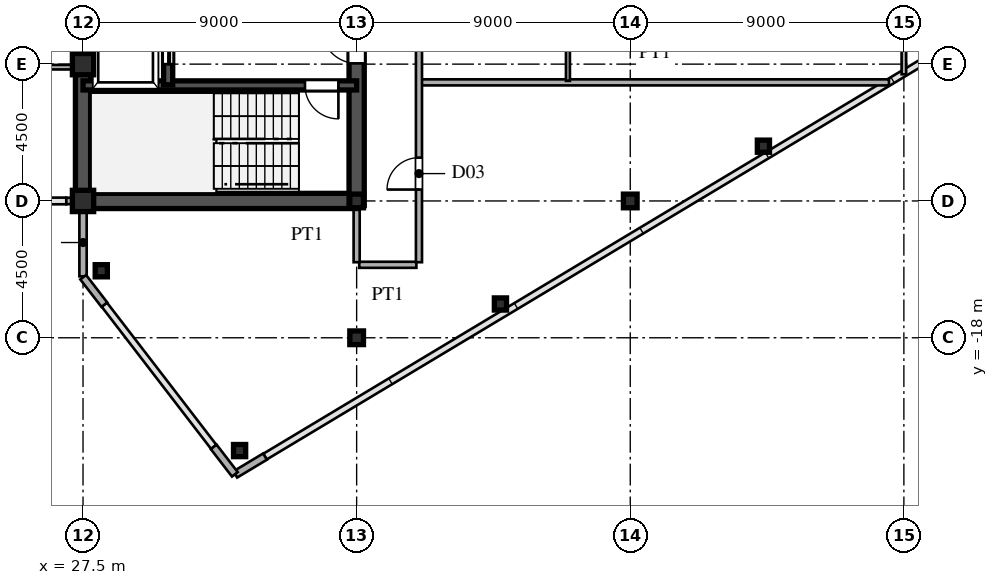
"""IFC4 building model, lengths in metres.
Left out: names, types, materials, properties, quantities, classifications, styles, units other than length and angle.
Written with IfcOpenShell. Run it as: python <this file> out.ifc"""

import sys

from ifc_helpers import new_model, si_unit, direction, frame, frame_2d, origin, origin_2d, place, context, subcontext, project, spatial, rectangle, hollow_rectangle, i_section, extrude, source, transform, mapped, element, fill, save


model = new_model("IFC4")
c1 = context("Model", 3, precision=1e-05, world=origin(), true_north=direction((0.0, 1.0)))
c2 = subcontext(c1, "Body", "Model", "MODEL_VIEW")
j1 = project(units=[si_unit("LENGTHUNIT", "METRE"), si_unit("PLANEANGLEUNIT", "RADIAN")], contexts=[c1])
p1 = place(None, origin())
s1 = spatial("IfcSite", under=j1, at=p1, CompositionType="ELEMENT")
p2 = place(p1, origin())
s2 = spatial("IfcBuilding", under=s1, at=p2, CompositionType="ELEMENT")
p3 = place(p2, frame((0.0, 0.0, 265.65)))
s3 = spatial("IfcBuildingStorey", under=s2, at=p3, CompositionType="ELEMENT", Elevation=265.65)
m1 = source(origin(), c2, "Body", "SweptSolid", [
    extrude(hollow_rectangle(XDim=0.7, YDim=0.7, WallThickness=0.03, at=origin_2d()), origin(), (0.0, 0.0, 1.0), 3.75),
])
for number, where, z_axis, x_axis in (
    (1, (27.5, -13.5, 0.0), (0.0, 0.0, 1.0), (1.0, 0.0, 0.0)),
    (2, (27.5, -9.0, 0.0), (0.0, 0.0, 1.0), (1.0, 0.0, 0.0)),
):
    element("IfcColumn", number, at=place(p3, frame(where, z_axis=z_axis, x_axis=x_axis)), inside=s3, PredefinedType="COLUMN", context=c2, shape_type="MappedRepresentation", body=[
        mapped(m1, transform((0.0, 0.0, 0.0), scale=1.0)),
    ])
m2 = source(origin(), c2, "Body", "SweptSolid", [
    extrude(i_section(OverallWidth=0.45, OverallDepth=0.45, WebThickness=0.016, FlangeThickness=0.025, at=origin_2d()), origin(), (0.0, 0.0, 1.0), 3.75),
])
for number, where, z_axis, x_axis in (
    (3, (36.5, -18.0, 0.0), (0.0, 0.0, 1.0), (1.0, 0.0, 0.0)),
    (4, (36.5, -13.5, 0.0), (0.0, 0.0, 1.0), (1.0, 0.0, 0.0)),
    (5, (45.5, -13.5, 0.0), (0.0, 0.0, 1.0), (1.0, 0.0, 0.0)),
):
    element("IfcColumn", number, at=place(p3, frame(where, z_axis=z_axis, x_axis=x_axis)), inside=s3, PredefinedType="COLUMN", context=c2, shape_type="MappedRepresentation", body=[
        mapped(m2, transform((0.0, 0.0, 0.0), scale=1.0)),
    ])
m3 = source(origin(), c2, "Body", "SweptSolid", [
    extrude(hollow_rectangle(XDim=0.4, YDim=0.4, WallThickness=0.016, at=origin_2d()), origin(), (0.0, 0.0, 1.0), 3.75),
])
for number, where, z_axis, x_axis in (
    (6, (32.65, -21.71, 0.0), (0.0, 0.0, 1.0), (1.0, 0.0, 0.0)),
    (7, (28.1, -15.796, 0.0), (0.0, 0.0, 1.0), (1.0, 0.0, 0.0)),
    (8, (41.23, -16.889, 0.0), (0.0, 0.0, 1.0), (1.0, 0.0, 0.0)),
    (9, (49.88, -11.699, 0.0), (0.0, 0.0, 1.0), (1.0, 0.0, 0.0)),
):
    element("IfcColumn", number, at=place(p3, frame(where, z_axis=z_axis, x_axis=x_axis)), inside=s3, PredefinedType="COLUMN", context=c2, shape_type="MappedRepresentation", body=[
        mapped(m3, transform((0.0, 0.0, 0.0), scale=1.0)),
    ])
p4 = place(p3, frame((32.509, -22.495, 0.0), z_axis=(0.0, 0.0, 1.0), x_axis=(0.85743623509, 0.514590228002, 0.0)))
e10 = element("IfcWall", 10, at=p4, inside=s3, PredefinedType="SOLIDWALL", context=c2, shape_type="SweptSolid", body=[
    extrude(rectangle(XDim=1.14, YDim=0.24, at=frame_2d((0.57, 0.0))), origin(), (0.0, 0.0, 1.0), 3.49),
])
p5 = place(p3, frame((27.5, -15.98, 0.0), z_axis=(0.0, 0.0, 1.0), x_axis=(0.0, 1.0, 0.0)))
e11 = element("IfcWall", 11, at=p5, inside=s3, PredefinedType="SOLIDWALL", context=c2, shape_type="SweptSolid", body=[
    extrude(rectangle(XDim=1.605, YDim=0.24, at=frame_2d((0.803, 0.0))), origin(), (0.0, 0.0, 1.0), 3.49),
])
p6 = place(p3, frame((27.5, -14.375, 0.0), z_axis=(0.0, 0.0, 1.0), x_axis=(0.0, 1.0, 0.0)))
e12 = element("IfcWall", 12, at=p6, inside=s3, PredefinedType="SOLIDWALL", context=c2, shape_type="SweptSolid", body=[
    extrude(rectangle(XDim=0.62, YDim=0.24, at=frame_2d((0.31, 0.0))), origin(), (0.0, 0.0, 1.0), 2.99),
])
for number, where, z_axis, x_axis in (
    (13, (27.506, -16.008, 0.0), (0.0, 0.0, 1.0), (0.61, -0.793, 0.0)),
    (14, (31.799, -21.588, 0.0), (0.0, 0.0, 1.0), (0.61, -0.793, 0.0)),
):
    element("IfcWall", number, at=place(p3, frame(where, z_axis=z_axis, x_axis=x_axis)), inside=s3, PredefinedType="SOLIDWALL", context=c2, shape_type="SweptSolid", body=[
        extrude(rectangle(XDim=1.14, YDim=0.24, at=frame_2d((0.57, 0.0))), origin(), (0.0, 0.0, 1.0), 3.49),
    ])
p7 = place(p3, frame((26.95, -13.5, 0.0), z_axis=(0.0, 0.0, 1.0), x_axis=(1.0, 0.0, 0.0)))
e15 = element("IfcWall", 15, at=p7, inside=s3, PredefinedType="SOLIDWALL", context=c2, shape_type="SweptSolid", body=[
    extrude(rectangle(XDim=0.54, YDim=0.21, at=frame_2d((0.27, 0.0))), origin(), (0.0, 0.0, 1.0), 2.99),
])
p8 = place(p3, frame((27.5, -13.5, 0.0), z_axis=(0.0, 0.0, 1.0), x_axis=(0.0, 1.0, 0.0)))
e16 = element("IfcWall", 16, at=p8, inside=s3, PredefinedType="SHEAR", context=c2, shape_type="SweptSolid", body=[
    extrude(rectangle(XDim=12.2, YDim=0.5, at=frame_2d((6.1, 0.0))), origin(), (0.0, 0.0, 1.0), 3.49),
])
p9 = place(p3, frame((27.5, -13.5, 0.0), z_axis=(0.0, 0.0, 1.0), x_axis=(1.0, 0.0, 0.0)))
e17 = element("IfcWall", 17, at=p9, inside=s3, PredefinedType="SHEAR", context=c2, shape_type="SweptSolid", body=[
    extrude(rectangle(XDim=9.0, YDim=0.5, at=frame_2d((4.5, 0.0))), origin(), (0.0, 0.0, 1.0), 3.49),
])
p10 = place(p3, frame((36.5, -13.65, 0.0), z_axis=(0.0, 0.0, 1.0), x_axis=(0.0, 1.0, 0.0)))
e18 = element("IfcWall", 18, at=p10, inside=s3, PredefinedType="SHEAR", context=c2, shape_type="SweptSolid", body=[
    extrude(rectangle(XDim=7.15, YDim=0.5, at=frame_2d((3.575, 0.0))), origin(), (0.0, 0.0, 1.0), 3.49),
])
p11 = place(p10, frame((4.675, 0.0, 0.0)))
e19 = element("IfcOpeningElement", 19, at=p11, cuts=e18, PredefinedType="OPENING", context=c2, shape_type="SweptSolid", body=[
    extrude(rectangle(XDim=1.15, YDim=2.2, at=frame_2d((0.575, 1.1))), frame((0.0, 0.26, 0.0), z_axis=(0.0, -1.0, 0.0), x_axis=(1.0, 0.0, 0.0)), (0.0, 0.0, 1.0), 0.52),
])
p12 = place(p3, frame((27.5, -9.7, 0.0), z_axis=(0.0, 0.0, 1.0), x_axis=(1.0, 0.0, 0.0)))
e20 = element("IfcWall", 20, at=p12, inside=s3, PredefinedType="SHEAR", context=c2, shape_type="SweptSolid", body=[
    extrude(rectangle(XDim=9.0, YDim=0.3, at=frame_2d((4.5, 0.0))), origin(), (0.0, 0.0, 1.0), 3.49),
])
p13 = place(p12, frame((7.3, 0.0, 0.0)))
e21 = element("IfcOpeningElement", 21, at=p13, cuts=e20, PredefinedType="OPENING", context=c2, shape_type="SweptSolid", body=[
    extrude(rectangle(XDim=1.1, YDim=2.2, at=frame_2d((0.55, 1.1))), frame((0.0, 0.16, 0.0), z_axis=(0.0, -1.0, 0.0), x_axis=(1.0, 0.0, 0.0)), (0.0, 0.0, 1.0), 0.32),
])
p14 = place(p3, frame((30.3, -9.68, 0.0), z_axis=(0.0, 0.0, 1.0), x_axis=(0.0, 1.0, 0.0)))
e22 = element("IfcWall", 22, at=p14, inside=s3, PredefinedType="SHEAR", context=c2, shape_type="SweptSolid", body=[
    extrude(rectangle(XDim=2.56, YDim=0.3, at=frame_2d((1.28, 0.0))), origin(), (0.0, 0.0, 1.0), 3.49),
])
p15 = place(p14, frame((0.68, 0.0, 0.0)))
e23 = element("IfcOpeningElement", 23, at=p15, cuts=e22, PredefinedType="OPENING", context=c2, shape_type="SweptSolid", body=[
    extrude(rectangle(XDim=1.2, YDim=2.25, at=frame_2d((0.6, 1.125))), frame((0.0, 0.16, 0.0), z_axis=(0.0, -1.0, 0.0), x_axis=(1.0, 0.0, 0.0)), (0.0, 0.0, 1.0), 0.32),
])
p16 = place(p3, frame((36.585, -15.6, 0.0), z_axis=(0.0, 0.0, 1.0), x_axis=(1.0, 0.0, 0.0)))
e24 = element("IfcWall", 24, at=p16, inside=s3, PredefinedType="PARTITIONING", context=c2, shape_type="SweptSolid", body=[
    extrude(rectangle(XDim=1.88, YDim=0.2, at=frame_2d((0.94, 0.0))), origin(), (0.0, 0.0, 1.0), 3.49),
])
p17 = place(p3, frame((38.63, -9.6, 0.0), z_axis=(0.0, 0.0, 1.0), x_axis=(1.0, 0.0, 0.0)))
e25 = element("IfcWall", 25, at=p17, inside=s3, PredefinedType="PARTITIONING", context=c2, shape_type="SweptSolid", body=[
    extrude(rectangle(XDim=15.38, YDim=0.2, at=frame_2d((7.69, 0.0))), origin(), (0.0, 0.0, 1.0), 3.49),
])
p18 = place(p3, frame((4.585, -9.1, 0.0), z_axis=(0.0, 0.0, 1.0), x_axis=(1.0, 0.0, 0.0)))
e26 = element("IfcWall", 26, at=p18, inside=s3, PredefinedType="PARTITIONING", context=c2, shape_type="SweptSolid", body=[
    extrude(rectangle(XDim=22.66, YDim=0.15, at=frame_2d((11.33, 0.0))), origin(), (0.0, 0.0, 1.0), 3.49),
])
p19 = place(p18, frame((3.94, 0.0, 0.0)))
e27 = element("IfcOpeningElement", 27, at=p19, cuts=e26, PredefinedType="OPENING", context=c2, shape_type="SweptSolid", body=[
    extrude(rectangle(XDim=0.95, YDim=2.15, at=frame_2d((0.475, 1.075))), frame((0.0, 0.085, 0.0), z_axis=(0.0, -1.0, 0.0), x_axis=(1.0, 0.0, 0.0)), (0.0, 0.0, 1.0), 0.17),
])
p20 = place(p18, frame((11.94, 0.0, 0.0)))
e28 = element("IfcOpeningElement", 28, at=p20, cuts=e26, PredefinedType="OPENING", context=c2, shape_type="SweptSolid", body=[
    extrude(rectangle(XDim=0.95, YDim=2.15, at=frame_2d((0.475, 1.075))), frame((0.0, 0.085, 0.0), z_axis=(0.0, -1.0, 0.0), x_axis=(1.0, 0.0, 0.0)), (0.0, 0.0, 1.0), 0.17),
])
p21 = place(p18, frame((18.94, 0.0, 0.0)))
e29 = element("IfcOpeningElement", 29, at=p21, cuts=e26, PredefinedType="OPENING", context=c2, shape_type="SweptSolid", body=[
    extrude(rectangle(XDim=0.95, YDim=2.15, at=frame_2d((0.475, 1.075))), frame((0.0, 0.085, 0.0), z_axis=(0.0, -1.0, 0.0), x_axis=(1.0, 0.0, 0.0)), (0.0, 0.0, 1.0), 0.17),
])
p22 = place(p3, frame((36.5, -15.515, 0.0), z_axis=(0.0, 0.0, 1.0), x_axis=(0.0, 1.0, 0.0)))
e30 = element("IfcWall", 30, at=p22, inside=s3, PredefinedType="PARTITIONING", context=c2, shape_type="SweptSolid", body=[
    extrude(rectangle(XDim=1.76, YDim=0.2, at=frame_2d((0.88, 0.0))), origin(), (0.0, 0.0, 1.0), 2.89),
])
p23 = place(p3, frame((38.55, -15.515, 0.0), z_axis=(0.0, 0.0, 1.0), x_axis=(0.0, 1.0, 0.0)))
e31 = element("IfcWall", 31, at=p23, inside=s3, PredefinedType="PARTITIONING", context=c2, shape_type="SweptSolid", body=[
    extrude(rectangle(XDim=31.03, YDim=0.2, at=frame_2d((15.515, 0.0))), origin(), (0.0, 0.0, 1.0), 3.49),
])
p24 = place(p23, frame((2.39, 0.0, 0.0)))
e32 = element("IfcOpeningElement", 32, at=p24, cuts=e31, PredefinedType="OPENING", context=c2, shape_type="SweptSolid", body=[
    extrude(rectangle(XDim=1.05, YDim=2.25, at=frame_2d((0.525, 1.125))), frame((0.0, 0.11, 0.0), z_axis=(0.0, -1.0, 0.0), x_axis=(1.0, 0.0, 0.0)), (0.0, 0.0, 1.0), 0.22),
])
p25 = place(p23, frame((11.889, 0.0, 0.0)))
e33 = element("IfcOpeningElement", 33, at=p25, cuts=e31, PredefinedType="OPENING", context=c2, shape_type="SweptSolid", body=[
    extrude(rectangle(XDim=1.05, YDim=2.25, at=frame_2d((0.525, 1.125))), frame((0.0, 0.11, 0.0), z_axis=(0.0, -1.0, 0.0), x_axis=(1.0, 0.0, 0.0)), (0.0, 0.0, 1.0), 0.22),
])
p26 = place(p23, frame((24.69, 0.0, 0.0)))
e34 = element("IfcOpeningElement", 34, at=p26, cuts=e31, PredefinedType="OPENING", context=c2, shape_type="SweptSolid", body=[
    extrude(rectangle(XDim=1.05, YDim=2.25, at=frame_2d((0.525, 1.125))), frame((0.0, 0.11, 0.0), z_axis=(0.0, -1.0, 0.0), x_axis=(1.0, 0.0, 0.0)), (0.0, 0.0, 1.0), 0.22),
])
p27 = place(p3, frame((43.45, -9.55, 0.0), z_axis=(0.0, 0.0, 1.0), x_axis=(0.0, 1.0, 0.0)))
e35 = element("IfcWall", 35, at=p27, inside=s3, PredefinedType="PARTITIONING", context=c2, shape_type="SweptSolid", body=[
    extrude(rectangle(XDim=8.833, YDim=0.13, at=frame_2d((4.417, 0.0))), origin(), (0.0, 0.0, 1.0), 3.49),
])
p28 = place(p27, frame((6.175, 0.0, 0.0)))
e36 = element("IfcOpeningElement", 36, at=p28, cuts=e35, PredefinedType="OPENING", context=c2, shape_type="SweptSolid", body=[
    extrude(rectangle(XDim=0.95, YDim=2.15, at=frame_2d((0.475, 1.075))), frame((0.0, 0.075, 0.0), z_axis=(0.0, -1.0, 0.0), x_axis=(1.0, 0.0, 0.0)), (0.0, 0.0, 1.0), 0.15),
])
p29 = place(p3, frame((54.5, -9.335, 0.0), z_axis=(0.0, 0.0, 1.0), x_axis=(0.0, 1.0, 0.0)))
e37 = element("IfcWall", 37, at=p29, inside=s3, PredefinedType="PARTITIONING", context=c2, shape_type="SweptSolid", body=[
    extrude(rectangle(XDim=13.085, YDim=0.15, at=frame_2d((6.542, 0.0))), origin(), (0.0, 0.0, 1.0), 2.89),
])
p30 = place(p29, frame((5.96, 0.0, 0.0)))
e38 = element("IfcOpeningElement", 38, at=p30, cuts=e37, PredefinedType="OPENING", context=c2, shape_type="SweptSolid", body=[
    extrude(rectangle(XDim=0.95, YDim=2.15, at=frame_2d((0.475, 1.075))), frame((0.0, 0.085, 0.0), z_axis=(0.0, -1.0, 0.0), x_axis=(1.0, 0.0, 0.0)), (0.0, 0.0, 1.0), 0.17),
])
p31 = place(p29, frame((1.643, 0.0, 0.0)))
e39 = element("IfcOpeningElement", 39, at=p31, cuts=e37, PredefinedType="OPENING", context=c2, shape_type="SweptSolid", body=[
    extrude(rectangle(XDim=0.95, YDim=2.15, at=frame_2d((0.475, 1.075))), frame((0.0, 0.085, 0.0), z_axis=(0.0, -1.0, 0.0), x_axis=(1.0, 0.0, 0.0)), (0.0, 0.0, 1.0), 0.17),
])
p32 = place(p29, frame((10.427, 0.0, 0.0)))
e40 = element("IfcOpeningElement", 40, at=p32, cuts=e37, PredefinedType="OPENING", context=c2, shape_type="SweptSolid", body=[
    extrude(rectangle(XDim=0.95, YDim=2.15, at=frame_2d((0.475, 1.075))), frame((0.0, 0.085, 0.0), z_axis=(0.0, -1.0, 0.0), x_axis=(1.0, 0.0, 0.0)), (0.0, 0.0, 1.0), 0.17),
])
m4 = source(origin(), c2, "Body", "SweptSolid", [
    extrude(rectangle(XDim=1.15, YDim=2.2, at=frame_2d((0.575, 1.1))), frame((0.0, 0.025, 0.0), z_axis=(0.0, -1.0, 0.0), x_axis=(1.0, 0.0, 0.0)), (0.0, 0.0, 1.0), 0.05),
])
p33 = place(p11, origin())
e41 = element("IfcDoor", 41, at=p33, inside=s3, OperationType="SINGLE_SWING_RIGHT", PredefinedType="DOOR", context=c2, shape_type="MappedRepresentation", body=[
    mapped(m4, transform((0.0, 0.0, 0.0), scale=1.0)),
])
fill(e19, e41)
m5 = source(origin(), c2, "Body", "SweptSolid", [
    extrude(rectangle(XDim=1.1, YDim=2.2, at=frame_2d((0.55, 1.1))), frame((0.0, 0.025, 0.0), z_axis=(0.0, -1.0, 0.0), x_axis=(1.0, 0.0, 0.0)), (0.0, 0.0, 1.0), 0.05),
])
p34 = place(p13, frame((1.1, 0.0, 0.0), z_axis=(0.0, 0.0, 1.0), x_axis=(-1.0, 0.0, 0.0)))
e42 = element("IfcDoor", 42, at=p34, inside=s3, OperationType="SINGLE_SWING_RIGHT", PredefinedType="DOOR", context=c2, shape_type="MappedRepresentation", body=[
    mapped(m5, transform((0.0, 0.0, 0.0), scale=1.0)),
])
fill(e21, e42)
m6 = source(origin(), c2, "Body", "SweptSolid", [
    extrude(rectangle(XDim=1.2, YDim=2.25, at=frame_2d((0.6, 1.125))), frame((0.0, 0.025, 0.0), z_axis=(0.0, -1.0, 0.0), x_axis=(1.0, 0.0, 0.0)), (0.0, 0.0, 1.0), 0.05),
])
p35 = place(p15, origin())
e43 = element("IfcDoor", 43, at=p35, inside=s3, OperationType="DOUBLE_DOOR_SLIDING", PredefinedType="DOOR", context=c2, shape_type="MappedRepresentation", body=[
    mapped(m6, transform((0.0, 0.0, 0.0), scale=1.0)),
])
fill(e23, e43)
m7 = source(origin(), c2, "Body", "SweptSolid", [
    extrude(rectangle(XDim=1.05, YDim=2.25, at=frame_2d((0.525, 1.125))), frame((0.0, 0.025, 0.0), z_axis=(0.0, -1.0, 0.0), x_axis=(1.0, 0.0, 0.0)), (0.0, 0.0, 1.0), 0.05),
])
p36 = place(p24, origin())
e44 = element("IfcDoor", 44, at=p36, inside=s3, OperationType="SINGLE_SWING_LEFT", PredefinedType="DOOR", context=c2, shape_type="MappedRepresentation", body=[
    mapped(m7, transform((0.0, 0.0, 0.0), scale=1.0)),
])
fill(e32, e44)
save(model, sys.argv[1])
